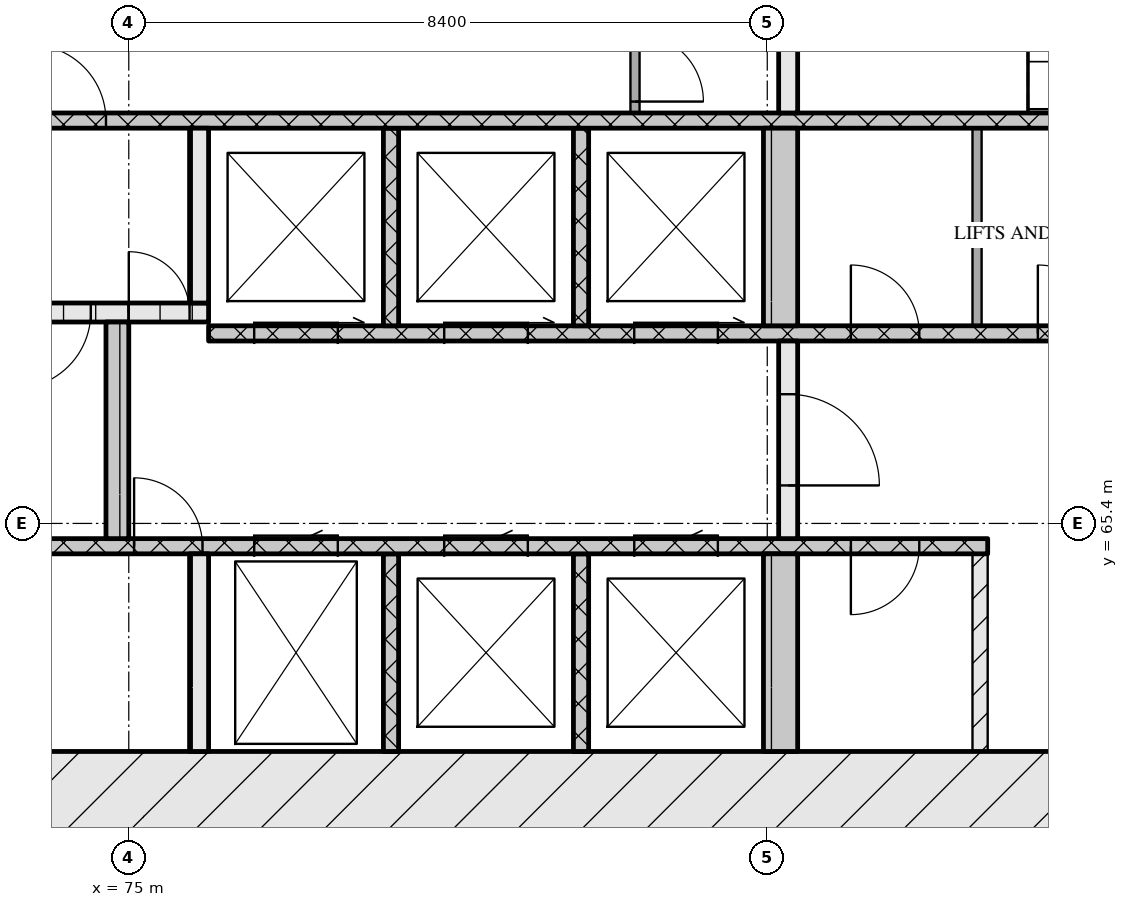
"""IFC4 building model, lengths in metres.
Left out: names, types, materials, properties, quantities, classifications, styles, units other than length and angle.
Written with IfcOpenShell. Run it as: python <this file> out.ifc"""

import sys

from ifc_helpers import new_model, si_unit, direction, frame, frame_2d, origin, place, context, subcontext, project, spatial, rectangle, extrude, element, fill, save


model = new_model("IFC4")
c1 = context("Model", 3, precision=1e-05, world=origin(), true_north=direction((0.0, 1.0)))
c2 = subcontext(c1, "Body", "Model", "MODEL_VIEW")
j1 = project(units=[si_unit("LENGTHUNIT", "METRE"), si_unit("PLANEANGLEUNIT", "RADIAN")], contexts=[c1])
p1 = place(None, origin())
s1 = spatial("IfcSite", under=j1, at=p1, CompositionType="ELEMENT")
p2 = place(p1, origin())
s2 = spatial("IfcBuilding", under=s1, at=p2, CompositionType="ELEMENT")
p3 = place(p2, frame((0.0, 0.0, 40.8)))
s3 = spatial("IfcBuildingStorey", under=s2, at=p3, CompositionType="ELEMENT", Elevation=40.8)
p4 = place(p3, frame((66.6, 61.8, 0.0), z_axis=(0.0, 0.0, 1.0), x_axis=(1.0, 0.0, 0.0)))
e1 = element("IfcWall", 1, at=p4, inside=s3, PredefinedType="SOLIDWALL", context=c2, shape_type="SweptSolid", body=[
    extrude(rectangle(XDim=42.0, YDim=1.2, at=frame_2d((21.0, 0.0))), origin(), (0.0, 0.0, 1.0), 3.32),
])
p5 = place(p4, frame((21.35, 0.0, 0.0)))
e2 = element("IfcOpeningElement", 2, at=p5, cuts=e1, PredefinedType="OPENING", context=c2, shape_type="SweptSolid", body=[
    extrude(rectangle(XDim=1.8, YDim=2.1, at=frame_2d((0.9, 1.05))), frame((0.0, 0.61, 0.0), z_axis=(0.0, -1.0, 0.0), x_axis=(1.0, 0.0, 0.0)), (0.0, 0.0, 1.0), 1.22),
])
p6 = place(p3, frame((75.925, 62.4, 0.0), z_axis=(0.0, 0.0, 1.0), x_axis=(0.0, 1.0, 0.0)))
e3 = element("IfcWall", 3, at=p6, inside=s3, PredefinedType="SOLIDWALL", context=c2, shape_type="SweptSolid", body=[
    extrude(rectangle(XDim=2.6, YDim=0.25, at=frame_2d((1.3, 0.0))), origin(), (0.0, 0.0, 1.0), 3.32),
])
for number, where, z_axis, x_axis in (
    (4, (78.45, 62.4, 0.0), (0.0, 0.0, 1.0), (0.0, 1.0, 0.0)),
    (5, (80.95, 62.4, 0.0), (0.0, 0.0, 1.0), (0.0, 1.0, 0.0)),
):
    element("IfcWall", number, at=place(p3, frame(where, z_axis=z_axis, x_axis=x_axis)), inside=s3, PredefinedType="SOLIDWALL", context=c2, shape_type="SweptSolid", body=[
        extrude(rectangle(XDim=2.6, YDim=0.2, at=frame_2d((1.3, 0.0))), origin(), (0.0, 0.0, 1.0), 3.32),
    ])
p7 = place(p3, frame((83.575, 62.4, 0.0), z_axis=(0.0, 0.0, 1.0), x_axis=(0.0, 1.0, 0.0)))
e6 = element("IfcWall", 6, at=p7, inside=s3, PredefinedType="SOLIDWALL", context=c2, shape_type="SweptSolid", body=[
    extrude(rectangle(XDim=2.6, YDim=0.45, at=frame_2d((1.3, 0.0))), origin(), (0.0, 0.0, 1.0), 3.32),
])
p8 = place(p3, frame((86.2, 62.4, 0.0), z_axis=(0.0, 0.0, 1.0), x_axis=(0.0, 1.0, 0.0)))
e7 = element("IfcWall", 7, at=p8, inside=s3, PredefinedType="PARTITIONING", context=c2, shape_type="SweptSolid", body=[
    extrude(rectangle(XDim=2.6, YDim=0.2, at=frame_2d((1.3, 0.0))), origin(), (0.0, 0.0, 1.0), 3.32),
])
p9 = place(p3, frame((67.8, 65.1, 0.0), z_axis=(0.0, 0.0, 1.0), x_axis=(1.0, 0.0, 0.0)))
e8 = element("IfcWall", 8, at=p9, inside=s3, PredefinedType="SOLIDWALL", context=c2, shape_type="SweptSolid", body=[
    extrude(rectangle(XDim=18.5, YDim=0.2, at=frame_2d((9.25, 0.0))), origin(), (0.0, 0.0, 1.0), 3.32),
])
p10 = place(p9, frame((7.27, 0.0, 0.0)))
e9 = element("IfcOpeningElement", 9, at=p10, cuts=e8, PredefinedType="OPENING", context=c2, shape_type="SweptSolid", body=[
    extrude(rectangle(XDim=0.9, YDim=2.1, at=frame_2d((0.45, 1.05))), frame((0.0, 0.11, 0.0), z_axis=(0.0, -1.0, 0.0), x_axis=(1.0, 0.0, 0.0)), (0.0, 0.0, 1.0), 0.22),
])
p11 = place(p9, frame((8.85, 0.0, 0.0)))
e10 = element("IfcOpeningElement", 10, at=p11, cuts=e8, PredefinedType="OPENING", context=c2, shape_type="SweptSolid", body=[
    extrude(rectangle(XDim=1.1, YDim=2.1, at=frame_2d((0.55, 1.05))), frame((0.0, 0.11, 0.0), z_axis=(0.0, -1.0, 0.0), x_axis=(1.0, 0.0, 0.0)), (0.0, 0.0, 1.0), 0.22),
])
p12 = place(p9, frame((11.35, 0.0, 0.0)))
e11 = element("IfcOpeningElement", 11, at=p12, cuts=e8, PredefinedType="OPENING", context=c2, shape_type="SweptSolid", body=[
    extrude(rectangle(XDim=1.1, YDim=2.1, at=frame_2d((0.55, 1.05))), frame((0.0, 0.11, 0.0), z_axis=(0.0, -1.0, 0.0), x_axis=(1.0, 0.0, 0.0)), (0.0, 0.0, 1.0), 0.22),
])
p13 = place(p9, frame((13.85, 0.0, 0.0)))
e12 = element("IfcOpeningElement", 12, at=p13, cuts=e8, PredefinedType="OPENING", context=c2, shape_type="SweptSolid", body=[
    extrude(rectangle(XDim=1.1, YDim=2.1, at=frame_2d((0.55, 1.05))), frame((0.0, 0.11, 0.0), z_axis=(0.0, -1.0, 0.0), x_axis=(1.0, 0.0, 0.0)), (0.0, 0.0, 1.0), 0.22),
])
p14 = place(p9, frame((16.7, 0.0, 0.0)))
e13 = element("IfcOpeningElement", 13, at=p14, cuts=e8, PredefinedType="OPENING", context=c2, shape_type="SweptSolid", body=[
    extrude(rectangle(XDim=0.9, YDim=2.1, at=frame_2d((0.45, 1.05))), frame((0.0, 0.11, 0.0), z_axis=(0.0, -1.0, 0.0), x_axis=(1.0, 0.0, 0.0)), (0.0, 0.0, 1.0), 0.22),
])
p15 = place(p3, frame((74.85, 65.2, 0.0), z_axis=(0.0, 0.0, 1.0), x_axis=(0.0, 1.0, 0.0)))
e14 = element("IfcWall", 14, at=p15, inside=s3, PredefinedType="SOLIDWALL", context=c2, shape_type="SweptSolid", body=[
    extrude(rectangle(XDim=2.85, YDim=0.3, at=frame_2d((1.425, 0.0))), origin(), (0.0, 0.0, 1.0), 3.32),
])
p16 = place(p3, frame((83.675, 65.2, 0.0), z_axis=(0.0, 0.0, 1.0), x_axis=(0.0, 1.0, 0.0)))
e15 = element("IfcWall", 15, at=p16, inside=s3, PredefinedType="SOLIDWALL", context=c2, shape_type="SweptSolid", body=[
    extrude(rectangle(XDim=2.6, YDim=0.25, at=frame_2d((1.3, 0.0))), origin(), (0.0, 0.0, 1.0), 3.32),
])
p17 = place(p16, frame((0.7, 0.0, 0.0)))
e16 = element("IfcOpeningElement", 16, at=p17, cuts=e15, PredefinedType="OPENING", context=c2, shape_type="SweptSolid", body=[
    extrude(rectangle(XDim=1.2, YDim=2.1, at=frame_2d((0.6, 1.05))), frame((0.0, 0.135, 0.0), z_axis=(0.0, -1.0, 0.0), x_axis=(1.0, 0.0, 0.0)), (0.0, 0.0, 1.0), 0.27),
])
p18 = place(p3, frame((76.05, 67.9, 0.0), z_axis=(0.0, 0.0, 1.0), x_axis=(1.0, 0.0, 0.0)))
e17 = element("IfcWall", 17, at=p18, inside=s3, PredefinedType="SOLIDWALL", context=c2, shape_type="SweptSolid", body=[
    extrude(rectangle(XDim=23.1, YDim=0.2, at=frame_2d((11.55, 0.0))), origin(), (0.0, 0.0, 1.0), 3.32),
])
p19 = place(p18, frame((0.6, 0.0, 0.0)))
e18 = element("IfcOpeningElement", 18, at=p19, cuts=e17, PredefinedType="OPENING", context=c2, shape_type="SweptSolid", body=[
    extrude(rectangle(XDim=1.1, YDim=2.1, at=frame_2d((0.55, 1.05))), frame((0.0, 0.11, 0.0), z_axis=(0.0, -1.0, 0.0), x_axis=(1.0, 0.0, 0.0)), (0.0, 0.0, 1.0), 0.22),
])
p20 = place(p18, frame((3.1, 0.0, 0.0)))
e19 = element("IfcOpeningElement", 19, at=p20, cuts=e17, PredefinedType="OPENING", context=c2, shape_type="SweptSolid", body=[
    extrude(rectangle(XDim=1.1, YDim=2.1, at=frame_2d((0.55, 1.05))), frame((0.0, 0.11, 0.0), z_axis=(0.0, -1.0, 0.0), x_axis=(1.0, 0.0, 0.0)), (0.0, 0.0, 1.0), 0.22),
])
p21 = place(p18, frame((5.6, 0.0, 0.0)))
e20 = element("IfcOpeningElement", 20, at=p21, cuts=e17, PredefinedType="OPENING", context=c2, shape_type="SweptSolid", body=[
    extrude(rectangle(XDim=1.1, YDim=2.1, at=frame_2d((0.55, 1.05))), frame((0.0, 0.11, 0.0), z_axis=(0.0, -1.0, 0.0), x_axis=(1.0, 0.0, 0.0)), (0.0, 0.0, 1.0), 0.22),
])
p22 = place(p18, frame((8.45, 0.0, 0.0)))
e21 = element("IfcOpeningElement", 21, at=p22, cuts=e17, PredefinedType="OPENING", context=c2, shape_type="SweptSolid", body=[
    extrude(rectangle(XDim=0.9, YDim=2.1, at=frame_2d((0.45, 1.05))), frame((0.0, 0.11, 0.0), z_axis=(0.0, -1.0, 0.0), x_axis=(1.0, 0.0, 0.0)), (0.0, 0.0, 1.0), 0.22),
])
p23 = place(p18, frame((10.91, 0.0, 0.0)))
e22 = element("IfcOpeningElement", 22, at=p23, cuts=e17, PredefinedType="OPENING", context=c2, shape_type="SweptSolid", body=[
    extrude(rectangle(XDim=0.9, YDim=2.1, at=frame_2d((0.45, 1.05))), frame((0.0, 0.11, 0.0), z_axis=(0.0, -1.0, 0.0), x_axis=(1.0, 0.0, 0.0)), (0.0, 0.0, 1.0), 0.22),
])
p24 = place(p18, frame((13.55, 0.0, 0.0)))
e23 = element("IfcOpeningElement", 23, at=p24, cuts=e17, PredefinedType="OPENING", context=c2, shape_type="SweptSolid", body=[
    extrude(rectangle(XDim=1.0, YDim=2.1, at=frame_2d((0.5, 1.05))), frame((0.0, 0.11, 0.0), z_axis=(0.0, -1.0, 0.0), x_axis=(1.0, 0.0, 0.0)), (0.0, 0.0, 1.0), 0.22),
])
for number, where, z_axis, x_axis in (
    (24, (78.45, 68.0, 0.0), (0.0, 0.0, 1.0), (0.0, 1.0, 0.0)),
    (25, (80.95, 68.0, 0.0), (0.0, 0.0, 1.0), (0.0, 1.0, 0.0)),
):
    element("IfcWall", number, at=place(p3, frame(where, z_axis=z_axis, x_axis=x_axis)), inside=s3, PredefinedType="SOLIDWALL", context=c2, shape_type="SweptSolid", body=[
        extrude(rectangle(XDim=2.6, YDim=0.2, at=frame_2d((1.3, 0.0))), origin(), (0.0, 0.0, 1.0), 3.32),
    ])
p25 = place(p3, frame((83.575, 68.0, 0.0), z_axis=(0.0, 0.0, 1.0), x_axis=(0.0, 1.0, 0.0)))
e26 = element("IfcWall", 26, at=p25, inside=s3, PredefinedType="SOLIDWALL", context=c2, shape_type="SweptSolid", body=[
    extrude(rectangle(XDim=2.6, YDim=0.45, at=frame_2d((1.3, 0.0))), origin(), (0.0, 0.0, 1.0), 3.32),
])
p26 = place(p3, frame((86.16, 68.0, 0.0), z_axis=(0.0, 0.0, 1.0), x_axis=(0.0, 1.0, 0.0)))
e27 = element("IfcWall", 27, at=p26, inside=s3, PredefinedType="PARTITIONING", context=c2, shape_type="SweptSolid", body=[
    extrude(rectangle(XDim=2.6, YDim=0.12, at=frame_2d((1.3, 0.0))), origin(), (0.0, 0.0, 1.0), 3.32),
])
p27 = place(p3, frame((67.8, 68.175, 0.0), z_axis=(0.0, 0.0, 1.0), x_axis=(1.0, 0.0, 0.0)))
e28 = element("IfcWall", 28, at=p27, inside=s3, PredefinedType="SOLIDWALL", context=c2, shape_type="SweptSolid", body=[
    extrude(rectangle(XDim=8.25, YDim=0.25, at=frame_2d((4.125, 0.0))), origin(), (0.0, 0.0, 1.0), 3.32),
])
p28 = place(p27, frame((5.7, 0.0, 0.0)))
e29 = element("IfcOpeningElement", 29, at=p28, cuts=e28, PredefinedType="OPENING", context=c2, shape_type="SweptSolid", body=[
    extrude(rectangle(XDim=1.0, YDim=2.1, at=frame_2d((0.5, 1.05))), frame((0.0, 0.135, 0.0), z_axis=(0.0, -1.0, 0.0), x_axis=(1.0, 0.0, 0.0)), (0.0, 0.0, 1.0), 0.27),
])
p29 = place(p27, frame((7.2, 0.0, 0.0)))
e30 = element("IfcOpeningElement", 30, at=p29, cuts=e28, PredefinedType="OPENING", context=c2, shape_type="SweptSolid", body=[
    extrude(rectangle(XDim=0.8, YDim=2.1, at=frame_2d((0.4, 1.05))), frame((0.0, 0.135, 0.0), z_axis=(0.0, -1.0, 0.0), x_axis=(1.0, 0.0, 0.0)), (0.0, 0.0, 1.0), 0.27),
])
p30 = place(p3, frame((75.925, 68.3, 0.0), z_axis=(0.0, 0.0, 1.0), x_axis=(0.0, 1.0, 0.0)))
e31 = element("IfcWall", 31, at=p30, inside=s3, PredefinedType="SOLIDWALL", context=c2, shape_type="SweptSolid", body=[
    extrude(rectangle(XDim=2.3, YDim=0.25, at=frame_2d((1.15, 0.0))), origin(), (0.0, 0.0, 1.0), 3.32),
])
p31 = place(p3, frame((67.8, 70.7, 0.0), z_axis=(0.0, 0.0, 1.0), x_axis=(1.0, 0.0, 0.0)))
e32 = element("IfcWall", 32, at=p31, inside=s3, PredefinedType="SOLIDWALL", context=c2, shape_type="SweptSolid", body=[
    extrude(rectangle(XDim=39.6, YDim=0.2, at=frame_2d((19.8, 0.0))), origin(), (0.0, 0.0, 1.0), 3.32),
])
p32 = place(p31, frame((0.65, 0.0, 0.0)))
e33 = element("IfcOpeningElement", 33, at=p32, cuts=e32, PredefinedType="OPENING", context=c2, shape_type="SweptSolid", body=[
    extrude(rectangle(XDim=1.1, YDim=2.1, at=frame_2d((0.55, 1.05))), frame((0.0, 0.11, 0.0), z_axis=(0.0, -1.0, 0.0), x_axis=(1.0, 0.0, 0.0)), (0.0, 0.0, 1.0), 0.22),
])
p33 = place(p31, frame((3.25, 0.0, 0.0)))
e34 = element("IfcOpeningElement", 34, at=p33, cuts=e32, PredefinedType="OPENING", context=c2, shape_type="SweptSolid", body=[
    extrude(rectangle(XDim=1.1, YDim=2.1, at=frame_2d((0.55, 1.05))), frame((0.0, 0.11, 0.0), z_axis=(0.0, -1.0, 0.0), x_axis=(1.0, 0.0, 0.0)), (0.0, 0.0, 1.0), 0.22),
])
p34 = place(p31, frame((5.9, 0.0, 0.0)))
e35 = element("IfcOpeningElement", 35, at=p34, cuts=e32, PredefinedType="OPENING", context=c2, shape_type="SweptSolid", body=[
    extrude(rectangle(XDim=1.0, YDim=2.1, at=frame_2d((0.5, 1.05))), frame((0.0, 0.11, 0.0), z_axis=(0.0, -1.0, 0.0), x_axis=(1.0, 0.0, 0.0)), (0.0, 0.0, 1.0), 0.22),
])
p35 = place(p31, frame((21.7, 0.0, 0.0)))
e36 = element("IfcOpeningElement", 36, at=p35, cuts=e32, PredefinedType="OPENING", context=c2, shape_type="SweptSolid", body=[
    extrude(rectangle(XDim=1.0, YDim=2.1, at=frame_2d((0.5, 1.05))), frame((0.0, 0.11, 0.0), z_axis=(0.0, -1.0, 0.0), x_axis=(1.0, 0.0, 0.0)), (0.0, 0.0, 1.0), 0.22),
])
p36 = place(p31, frame((32.7, 0.0, 0.0)))
e37 = element("IfcOpeningElement", 37, at=p36, cuts=e32, PredefinedType="OPENING", context=c2, shape_type="SweptSolid", body=[
    extrude(rectangle(XDim=1.0, YDim=2.1, at=frame_2d((0.5, 1.05))), frame((0.0, 0.11, 0.0), z_axis=(0.0, -1.0, 0.0), x_axis=(1.0, 0.0, 0.0)), (0.0, 0.0, 1.0), 0.22),
])
p37 = place(p31, frame((35.25, 0.0, 0.0)))
e38 = element("IfcOpeningElement", 38, at=p37, cuts=e32, PredefinedType="OPENING", context=c2, shape_type="SweptSolid", body=[
    extrude(rectangle(XDim=1.1, YDim=2.1, at=frame_2d((0.55, 1.05))), frame((0.0, 0.11, 0.0), z_axis=(0.0, -1.0, 0.0), x_axis=(1.0, 0.0, 0.0)), (0.0, 0.0, 1.0), 0.22),
])
p38 = place(p31, frame((37.85, 0.0, 0.0)))
e39 = element("IfcOpeningElement", 39, at=p38, cuts=e32, PredefinedType="OPENING", context=c2, shape_type="SweptSolid", body=[
    extrude(rectangle(XDim=1.1, YDim=2.1, at=frame_2d((0.55, 1.05))), frame((0.0, 0.11, 0.0), z_axis=(0.0, -1.0, 0.0), x_axis=(1.0, 0.0, 0.0)), (0.0, 0.0, 1.0), 0.22),
])
p39 = place(p3, frame((81.66, 70.8, 0.0), z_axis=(0.0, 0.0, 1.0), x_axis=(0.0, 1.0, 0.0)))
e40 = element("IfcWall", 40, at=p39, inside=s3, PredefinedType="PARTITIONING", context=c2, shape_type="SweptSolid", body=[
    extrude(rectangle(XDim=1.2, YDim=0.12, at=frame_2d((0.6, 0.0))), origin(), (0.0, 0.0, 1.0), 3.32),
])
p40 = place(p39, frame((0.15, 0.0, 0.0)))
e41 = element("IfcOpeningElement", 41, at=p40, cuts=e40, PredefinedType="OPENING", context=c2, shape_type="SweptSolid", body=[
    extrude(rectangle(XDim=0.9, YDim=2.1, at=frame_2d((0.45, 1.05))), frame((0.0, 0.07, 0.0), z_axis=(0.0, -1.0, 0.0), x_axis=(1.0, 0.0, 0.0)), (0.0, 0.0, 1.0), 0.14),
])
p41 = place(p3, frame((83.675, 70.8, 0.0), z_axis=(0.0, 0.0, 1.0), x_axis=(0.0, 1.0, 0.0)))
e42 = element("IfcWall", 42, at=p41, inside=s3, PredefinedType="SOLIDWALL", context=c2, shape_type="SweptSolid", body=[
    extrude(rectangle(XDim=2.95, YDim=0.25, at=frame_2d((1.475, 0.0))), origin(), (0.0, 0.0, 1.0), 3.32),
])
p42 = place(p10, origin())
e43 = element("IfcDoor", 43, at=p42, inside=s3, OperationType="SINGLE_SWING_LEFT", PredefinedType="DOOR", context=c2, shape_type="SweptSolid", body=[
    extrude(rectangle(XDim=0.9, YDim=2.1, at=frame_2d((0.45, 1.05))), frame((0.0, 0.025, 0.0), z_axis=(0.0, -1.0, 0.0), x_axis=(1.0, 0.0, 0.0)), (0.0, 0.0, 1.0), 0.05),
])
fill(e9, e43)
p43 = place(p11, origin())
e44 = element("IfcDoor", 44, at=p43, inside=s3, OperationType="SLIDING_TO_LEFT", PredefinedType="DOOR", context=c2, shape_type="SweptSolid", body=[
    extrude(rectangle(XDim=1.1, YDim=2.1, at=frame_2d((0.55, 1.05))), frame((0.0, 0.025, 0.0), z_axis=(0.0, -1.0, 0.0), x_axis=(1.0, 0.0, 0.0)), (0.0, 0.0, 1.0), 0.05),
])
fill(e10, e44)
p44 = place(p12, origin())
e45 = element("IfcDoor", 45, at=p44, inside=s3, OperationType="SLIDING_TO_LEFT", PredefinedType="DOOR", context=c2, shape_type="SweptSolid", body=[
    extrude(rectangle(XDim=1.1, YDim=2.1, at=frame_2d((0.55, 1.05))), frame((0.0, 0.025, 0.0), z_axis=(0.0, -1.0, 0.0), x_axis=(1.0, 0.0, 0.0)), (0.0, 0.0, 1.0), 0.05),
])
fill(e11, e45)
p45 = place(p13, origin())
e46 = element("IfcDoor", 46, at=p45, inside=s3, OperationType="SLIDING_TO_LEFT", PredefinedType="DOOR", context=c2, shape_type="SweptSolid", body=[
    extrude(rectangle(XDim=1.1, YDim=2.1, at=frame_2d((0.55, 1.05))), frame((0.0, 0.025, 0.0), z_axis=(0.0, -1.0, 0.0), x_axis=(1.0, 0.0, 0.0)), (0.0, 0.0, 1.0), 0.05),
])
fill(e12, e46)
p46 = place(p14, origin())
e47 = element("IfcDoor", 47, at=p46, inside=s3, OperationType="SINGLE_SWING_RIGHT", PredefinedType="DOOR", context=c2, shape_type="SweptSolid", body=[
    extrude(rectangle(XDim=0.9, YDim=2.1, at=frame_2d((0.45, 1.05))), frame((0.0, 0.025, 0.0), z_axis=(0.0, -1.0, 0.0), x_axis=(1.0, 0.0, 0.0)), (0.0, 0.0, 1.0), 0.05),
])
fill(e13, e47)
p47 = place(p17, origin())
e48 = element("IfcDoor", 48, at=p47, inside=s3, OperationType="SINGLE_SWING_RIGHT", PredefinedType="DOOR", context=c2, shape_type="SweptSolid", body=[
    extrude(rectangle(XDim=1.2, YDim=2.1, at=frame_2d((0.6, 1.05))), frame((0.0, 0.025, 0.0), z_axis=(0.0, -1.0, 0.0), x_axis=(1.0, 0.0, 0.0)), (0.0, 0.0, 1.0), 0.05),
])
fill(e16, e48)
p48 = place(p19, origin())
e49 = element("IfcDoor", 49, at=p48, inside=s3, OperationType="SLIDING_TO_RIGHT", PredefinedType="DOOR", context=c2, shape_type="SweptSolid", body=[
    extrude(rectangle(XDim=1.1, YDim=2.1, at=frame_2d((0.55, 1.05))), frame((0.0, 0.025, 0.0), z_axis=(0.0, -1.0, 0.0), x_axis=(1.0, 0.0, 0.0)), (0.0, 0.0, 1.0), 0.05),
])
fill(e18, e49)
p49 = place(p20, origin())
e50 = element("IfcDoor", 50, at=p49, inside=s3, OperationType="SLIDING_TO_RIGHT", PredefinedType="DOOR", context=c2, shape_type="SweptSolid", body=[
    extrude(rectangle(XDim=1.1, YDim=2.1, at=frame_2d((0.55, 1.05))), frame((0.0, 0.025, 0.0), z_axis=(0.0, -1.0, 0.0), x_axis=(1.0, 0.0, 0.0)), (0.0, 0.0, 1.0), 0.05),
])
fill(e19, e50)
p50 = place(p21, origin())
e51 = element("IfcDoor", 51, at=p50, inside=s3, OperationType="SLIDING_TO_RIGHT", PredefinedType="DOOR", context=c2, shape_type="SweptSolid", body=[
    extrude(rectangle(XDim=1.1, YDim=2.1, at=frame_2d((0.55, 1.05))), frame((0.0, 0.025, 0.0), z_axis=(0.0, -1.0, 0.0), x_axis=(1.0, 0.0, 0.0)), (0.0, 0.0, 1.0), 0.05),
])
fill(e20, e51)
p51 = place(p22, origin())
e52 = element("IfcDoor", 52, at=p51, inside=s3, OperationType="SINGLE_SWING_LEFT", PredefinedType="DOOR", context=c2, shape_type="SweptSolid", body=[
    extrude(rectangle(XDim=0.9, YDim=2.1, at=frame_2d((0.45, 1.05))), frame((0.0, 0.025, 0.0), z_axis=(0.0, -1.0, 0.0), x_axis=(1.0, 0.0, 0.0)), (0.0, 0.0, 1.0), 0.05),
])
fill(e21, e52)
p52 = place(p23, origin())
e53 = element("IfcDoor", 53, at=p52, inside=s3, OperationType="SINGLE_SWING_LEFT", PredefinedType="DOOR", context=c2, shape_type="SweptSolid", body=[
    extrude(rectangle(XDim=0.9, YDim=2.1, at=frame_2d((0.45, 1.05))), frame((0.0, 0.025, 0.0), z_axis=(0.0, -1.0, 0.0), x_axis=(1.0, 0.0, 0.0)), (0.0, 0.0, 1.0), 0.05),
])
fill(e22, e53)
p53 = place(p28, origin())
e54 = element("IfcDoor", 54, at=p53, inside=s3, OperationType="SINGLE_SWING_RIGHT", PredefinedType="DOOR", context=c2, shape_type="SweptSolid", body=[
    extrude(rectangle(XDim=1.0, YDim=2.1, at=frame_2d((0.5, 1.05))), frame((0.0, 0.025, 0.0), z_axis=(0.0, -1.0, 0.0), x_axis=(1.0, 0.0, 0.0)), (0.0, 0.0, 1.0), 0.05),
])
fill(e29, e54)
p54 = place(p29, origin())
e55 = element("IfcDoor", 55, at=p54, inside=s3, OperationType="SINGLE_SWING_LEFT", PredefinedType="DOOR", context=c2, shape_type="SweptSolid", body=[
    extrude(rectangle(XDim=0.8, YDim=2.1, at=frame_2d((0.4, 1.05))), frame((0.0, 0.025, 0.0), z_axis=(0.0, -1.0, 0.0), x_axis=(1.0, 0.0, 0.0)), (0.0, 0.0, 1.0), 0.05),
])
fill(e30, e55)
p55 = place(p34, origin())
e56 = element("IfcDoor", 56, at=p55, inside=s3, OperationType="SINGLE_SWING_LEFT", PredefinedType="DOOR", context=c2, shape_type="SweptSolid", body=[
    extrude(rectangle(XDim=1.0, YDim=2.1, at=frame_2d((0.5, 1.05))), frame((0.0, 0.025, 0.0), z_axis=(0.0, -1.0, 0.0), x_axis=(1.0, 0.0, 0.0)), (0.0, 0.0, 1.0), 0.05),
])
fill(e35, e56)
p56 = place(p40, origin())
e57 = element("IfcDoor", 57, at=p56, inside=s3, OperationType="SINGLE_SWING_RIGHT", PredefinedType="DOOR", context=c2, shape_type="SweptSolid", body=[
    extrude(rectangle(XDim=0.9, YDim=2.1, at=frame_2d((0.45, 1.05))), frame((0.0, 0.025, 0.0), z_axis=(0.0, -1.0, 0.0), x_axis=(1.0, 0.0, 0.0)), (0.0, 0.0, 1.0), 0.05),
])
fill(e41, e57)
save(model, sys.argv[1])
